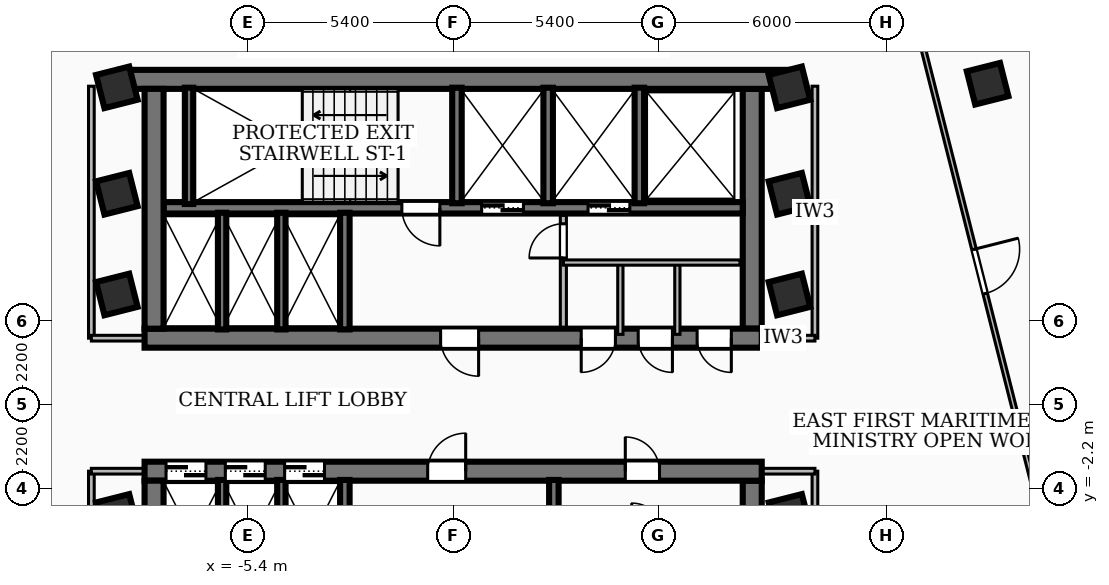
"""IFC4 building model, lengths in metres.
Left out: names, types, materials, properties, quantities, classifications, styles, units other than length and angle.
Written with IfcOpenShell. Run it as: python <this file> out.ifc"""

import sys

from ifc_helpers import new_model, si_unit, direction, frame, frame_2d, origin, origin_2d, place, context, subcontext, project, spatial, rectangle, extrude, element, fill, save


model = new_model("IFC4")
c1 = context("Model", 3, precision=1e-05, world=origin(), true_north=direction((0.0, 1.0)))
c2 = subcontext(c1, "Body", "Model", "MODEL_VIEW")
j1 = project(units=[si_unit("LENGTHUNIT", "METRE"), si_unit("PLANEANGLEUNIT", "RADIAN")], contexts=[c1])
p1 = place(None, origin())
s1 = spatial("IfcSite", under=j1, at=p1, CompositionType="ELEMENT")
p2 = place(p1, origin())
s2 = spatial("IfcBuilding", under=s1, at=p2, CompositionType="ELEMENT")
p3 = place(p2, frame((0.0, 0.0, 130.68)))
s3 = spatial("IfcBuildingStorey", under=s2, at=p3, CompositionType="ELEMENT", Elevation=130.68)
p4 = place(p3, frame((-8.78, 8.56, 0.0), z_axis=(0.0, 0.0, 1.0), x_axis=(1.0, 0.0, 0.0)))
e1 = element("IfcWall", 1, at=p4, inside=s3, PredefinedType="SHEAR", context=c2, shape_type="SweptSolid", body=[
    extrude(rectangle(XDim=17.56, YDim=0.5, at=frame_2d((8.78, 0.0))), origin(), (0.0, 0.0, 1.0), 3.32),
])
p5 = place(p3, frame((8.12, 1.75, 0.0), z_axis=(0.0, 0.0, 1.0), x_axis=(-1.0, 0.0, 0.0)))
e2 = element("IfcWall", 2, at=p5, inside=s3, PredefinedType="SHEAR", context=c2, shape_type="SweptSolid", body=[
    extrude(rectangle(XDim=16.24, YDim=0.5, at=frame_2d((8.12, 0.0))), origin(), (0.0, 0.0, 1.0), 3.32),
])
p6 = place(p5, frame((7.45, 0.0, 0.0)))
e3 = element("IfcOpeningElement", 3, at=p6, cuts=e2, PredefinedType="OPENING", context=c2, shape_type="SweptSolid", body=[
    extrude(rectangle(XDim=1.0, YDim=2.1, at=frame_2d((0.5, 1.05))), frame((0.0, 0.26, 0.0), z_axis=(0.0, -1.0, 0.0), x_axis=(1.0, 0.0, 0.0)), (0.0, 0.0, 1.0), 0.52),
])
p7 = place(p5, frame((3.85, 0.0, 0.0)))
e4 = element("IfcOpeningElement", 4, at=p7, cuts=e2, PredefinedType="OPENING", context=c2, shape_type="SweptSolid", body=[
    extrude(rectangle(XDim=0.9, YDim=2.06, at=frame_2d((0.45, 1.03))), frame((0.0, 0.26, 0.0), z_axis=(0.0, -1.0, 0.0), x_axis=(1.0, 0.0, 0.0)), (0.0, 0.0, 1.0), 0.52),
])
p8 = place(p5, frame((2.35, 0.0, 0.0)))
e5 = element("IfcOpeningElement", 5, at=p8, cuts=e2, PredefinedType="OPENING", context=c2, shape_type="SweptSolid", body=[
    extrude(rectangle(XDim=0.9, YDim=2.06, at=frame_2d((0.45, 1.03))), frame((0.0, 0.26, 0.0), z_axis=(0.0, -1.0, 0.0), x_axis=(1.0, 0.0, 0.0)), (0.0, 0.0, 1.0), 0.52),
])
p9 = place(p5, frame((0.8, 0.0, 0.0)))
e6 = element("IfcOpeningElement", 6, at=p9, cuts=e2, PredefinedType="OPENING", context=c2, shape_type="SweptSolid", body=[
    extrude(rectangle(XDim=0.9, YDim=2.06, at=frame_2d((0.45, 1.03))), frame((0.0, 0.26, 0.0), z_axis=(0.0, -1.0, 0.0), x_axis=(1.0, 0.0, 0.0)), (0.0, 0.0, 1.0), 0.52),
])
for number, where, z_axis, x_axis in (
    (7, (-7.87, 2.0, 0.0), (0.0, 0.0, 1.0), (0.0, 1.0, 0.0)),
    (8, (7.87, 8.31, 0.0), (0.0, 0.0, 1.0), (0.0, -1.0, 0.0)),
):
    element("IfcWall", number, at=place(p3, frame(where, z_axis=z_axis, x_axis=x_axis)), inside=s3, PredefinedType="SHEAR", context=c2, shape_type="SweptSolid", body=[
        extrude(rectangle(XDim=6.31, YDim=0.5, at=frame_2d((3.155, 0.0))), origin(), (0.0, 0.0, 1.0), 3.32),
    ])
p10 = place(p3, frame((7.62, 5.18, 0.0), z_axis=(0.0, 0.0, 1.0), x_axis=(-1.0, 0.0, 0.0)))
e9 = element("IfcWall", 9, at=p10, inside=s3, PredefinedType="SOLIDWALL", context=c2, shape_type="SweptSolid", body=[
    extrude(rectangle(XDim=15.24, YDim=0.3, at=frame_2d((7.62, 0.0))), origin(), (0.0, 0.0, 1.0), 3.32),
])
p11 = place(p10, frame((5.77, 0.0, 0.0)))
e10 = element("IfcOpeningElement", 10, at=p11, cuts=e9, PredefinedType="OPENING", context=c2, shape_type="SweptSolid", body=[
    extrude(rectangle(XDim=1.1, YDim=2.15, at=frame_2d((0.55, 1.075))), frame((0.0, 0.16, 0.0), z_axis=(0.0, -1.0, 0.0), x_axis=(1.0, 0.0, 0.0)), (0.0, 0.0, 1.0), 0.32),
])
p12 = place(p10, frame((2.97, 0.0, 0.0)))
e11 = element("IfcOpeningElement", 11, at=p12, cuts=e9, PredefinedType="OPENING", context=c2, shape_type="SweptSolid", body=[
    extrude(rectangle(XDim=1.1, YDim=2.15, at=frame_2d((0.55, 1.075))), frame((0.0, 0.16, 0.0), z_axis=(0.0, -1.0, 0.0), x_axis=(1.0, 0.0, 0.0)), (0.0, 0.0, 1.0), 0.32),
])
p13 = place(p10, frame((7.97, 0.0, 0.0)))
e12 = element("IfcOpeningElement", 12, at=p13, cuts=e9, PredefinedType="OPENING", context=c2, shape_type="SweptSolid", body=[
    extrude(rectangle(XDim=1.0, YDim=2.1, at=frame_2d((0.5, 1.05))), frame((0.0, 0.16, 0.0), z_axis=(0.0, -1.0, 0.0), x_axis=(1.0, 0.0, 0.0)), (0.0, 0.0, 1.0), 0.32),
])
p14 = place(p3, frame((-8.12, -1.75, 0.0), z_axis=(0.0, 0.0, 1.0), x_axis=(1.0, 0.0, 0.0)))
e13 = element("IfcWall", 13, at=p14, inside=s3, PredefinedType="SHEAR", context=c2, shape_type="SweptSolid", body=[
    extrude(rectangle(XDim=16.24, YDim=0.5, at=frame_2d((8.12, 0.0))), origin(), (0.0, 0.0, 1.0), 3.32),
])
p15 = place(p14, frame((7.45, 0.0, 0.0)))
e14 = element("IfcOpeningElement", 14, at=p15, cuts=e13, PredefinedType="OPENING", context=c2, shape_type="SweptSolid", body=[
    extrude(rectangle(XDim=1.0, YDim=2.1, at=frame_2d((0.5, 1.05))), frame((0.0, 0.26, 0.0), z_axis=(0.0, -1.0, 0.0), x_axis=(1.0, 0.0, 0.0)), (0.0, 0.0, 1.0), 0.52),
])
p16 = place(p14, frame((12.65, 0.0, 0.0)))
e15 = element("IfcOpeningElement", 15, at=p16, cuts=e13, PredefinedType="OPENING", context=c2, shape_type="SweptSolid", body=[
    extrude(rectangle(XDim=0.9, YDim=2.06, at=frame_2d((0.45, 1.03))), frame((0.0, 0.26, 0.0), z_axis=(0.0, -1.0, 0.0), x_axis=(1.0, 0.0, 0.0)), (0.0, 0.0, 1.0), 0.52),
])
p17 = place(p14, frame((0.565, 0.0, 0.0)))
e16 = element("IfcOpeningElement", 16, at=p17, cuts=e13, PredefinedType="OPENING", context=c2, shape_type="SweptSolid", body=[
    extrude(rectangle(XDim=1.05, YDim=2.15, at=frame_2d((0.525, 1.075))), frame((0.0, 0.26, 0.0), z_axis=(0.0, -1.0, 0.0), x_axis=(1.0, 0.0, 0.0)), (0.0, 0.0, 1.0), 0.52),
])
p18 = place(p14, frame((2.125, 0.0, 0.0)))
e17 = element("IfcOpeningElement", 17, at=p18, cuts=e13, PredefinedType="OPENING", context=c2, shape_type="SweptSolid", body=[
    extrude(rectangle(XDim=1.05, YDim=2.15, at=frame_2d((0.525, 1.075))), frame((0.0, 0.26, 0.0), z_axis=(0.0, -1.0, 0.0), x_axis=(1.0, 0.0, 0.0)), (0.0, 0.0, 1.0), 0.52),
])
p19 = place(p14, frame((3.685, 0.0, 0.0)))
e18 = element("IfcOpeningElement", 18, at=p19, cuts=e13, PredefinedType="OPENING", context=c2, shape_type="SweptSolid", body=[
    extrude(rectangle(XDim=1.05, YDim=2.15, at=frame_2d((0.525, 1.075))), frame((0.0, 0.26, 0.0), z_axis=(0.0, -1.0, 0.0), x_axis=(1.0, 0.0, 0.0)), (0.0, 0.0, 1.0), 0.52),
])
for number, where, z_axis, x_axis in (
    (19, (-7.87, -8.31, 0.0), (0.0, 0.0, 1.0), (0.0, 1.0, 0.0)),
    (20, (7.87, -2.0, 0.0), (0.0, 0.0, 1.0), (0.0, -1.0, 0.0)),
):
    element("IfcWall", number, at=place(p3, frame(where, z_axis=z_axis, x_axis=x_axis)), inside=s3, PredefinedType="SHEAR", context=c2, shape_type="SweptSolid", body=[
        extrude(rectangle(XDim=6.31, YDim=0.5, at=frame_2d((3.155, 0.0))), origin(), (0.0, 0.0, 1.0), 3.32),
    ])
p20 = place(p3, frame((-6.95, 5.28, 0.0), z_axis=(0.0, 0.0, 1.0), x_axis=(0.0, 1.0, 0.0)))
e21 = element("IfcWall", 21, at=p20, inside=s3, PredefinedType="SOLIDWALL", context=c2, shape_type="SweptSolid", body=[
    extrude(rectangle(XDim=3.06, YDim=0.22, at=frame_2d((1.53, 0.0))), origin(), (0.0, 0.0, 1.0), 3.32),
])
for number, where, z_axis, x_axis in (
    (22, (0.1, 5.3, 0.0), (0.0, 0.0, 1.0), (0.0, 1.0, 0.0)),
    (23, (2.5, 5.3, 0.0), (0.0, 0.0, 1.0), (0.0, 1.0, 0.0)),
    (24, (4.9, 5.3, 0.0), (0.0, 0.0, 1.0), (0.0, 1.0, 0.0)),
):
    element("IfcWall", number, at=place(p3, frame(where, z_axis=z_axis, x_axis=x_axis)), inside=s3, PredefinedType="SOLIDWALL", context=c2, shape_type="SweptSolid", body=[
        extrude(rectangle(XDim=3.04, YDim=0.25, at=frame_2d((1.52, 0.0))), origin(), (0.0, 0.0, 1.0), 3.32),
    ])
for number, where, z_axis, x_axis in (
    (25, (-2.85, 1.98, 0.0), (0.0, 0.0, 1.0), (0.0, 1.0, 0.0)),
    (26, (-2.85, -5.05, 0.0), (0.0, 0.0, 1.0), (0.0, 1.0, 0.0)),
    (27, (2.65, -5.05, 0.0), (0.0, 0.0, 1.0), (0.0, 1.0, 0.0)),
):
    element("IfcWall", number, at=place(p3, frame(where, z_axis=z_axis, x_axis=x_axis)), inside=s3, PredefinedType="SOLIDWALL", context=c2, shape_type="SweptSolid", body=[
        extrude(rectangle(XDim=3.07, YDim=0.25, at=frame_2d((1.535, 0.0))), origin(), (0.0, 0.0, 1.0), 3.32),
    ])
for number, where, z_axis, x_axis in (
    (28, (-6.08, 1.98, 0.0), (0.0, 0.0, 1.0), (0.0, 1.0, 0.0)),
    (29, (-4.52, 1.98, 0.0), (0.0, 0.0, 1.0), (0.0, 1.0, 0.0)),
    (30, (-6.08, -5.05, 0.0), (0.0, 0.0, 1.0), (0.0, 1.0, 0.0)),
    (31, (-4.52, -5.05, 0.0), (0.0, 0.0, 1.0), (0.0, 1.0, 0.0)),
):
    element("IfcWall", number, at=place(p3, frame(where, z_axis=z_axis, x_axis=x_axis)), inside=s3, PredefinedType="SOLIDWALL", context=c2, shape_type="SweptSolid", body=[
        extrude(rectangle(XDim=3.07, YDim=0.22, at=frame_2d((1.535, 0.0))), origin(), (0.0, 0.0, 1.0), 3.32),
    ])
for number, where, z_axis, x_axis in (
    (32, (-8.85, -2.9, 0.0), (0.0, 0.0, 1.0), (0.969, 0.245, 0.0)),
    (33, (-8.85, 2.9, 0.0), (0.0, 0.0, 1.0), (0.969, 0.245, 0.0)),
    (34, (-8.85, 5.55, 0.0), (0.0, 0.0, 1.0), (0.969, 0.245, 0.0)),
    (35, (8.85, -2.9, 0.0), (0.0, 0.0, 1.0), (0.969, 0.245, 0.0)),
    (36, (8.85, 2.9, 0.0), (0.0, 0.0, 1.0), (0.969, 0.245, 0.0)),
    (37, (8.85, 5.55, 0.0), (0.0, 0.0, 1.0), (0.969, 0.245, 0.0)),
    (38, (-8.85, 8.35, 0.0), (0.0, 0.0, 1.0), (0.969, 0.245, 0.0)),
    (39, (8.85, 8.35, 0.0), (0.0, 0.0, 1.0), (0.969, 0.245, 0.0)),
    (40, (14.064, 8.445, 0.0), (0.0, 0.0, 1.0), (0.969, 0.245, 0.0)),
):
    element("IfcColumn", number, at=place(p3, frame(where, z_axis=z_axis, x_axis=x_axis)), inside=s3, PredefinedType="COLUMN", context=c2, shape_type="SweptSolid", body=[
        extrude(rectangle(XDim=0.9, YDim=0.9, at=origin_2d()), origin(), (0.0, 0.0, 1.0), 3.6),
    ])
p21 = place(p3, frame((2.9, 2.04, 0.0), z_axis=(0.0, 0.0, 1.0), x_axis=(0.0, 1.0, 0.0)))
e41 = element("IfcWall", 41, at=p21, inside=s3, PredefinedType="PARTITIONING", context=c2, shape_type="SweptSolid", body=[
    extrude(rectangle(XDim=2.94, YDim=0.16, at=frame_2d((1.47, 0.0))), origin(), (0.0, 0.0, 1.0), 2.55),
])
p22 = place(p21, frame((1.82, 0.0, 0.0)))
e42 = element("IfcOpeningElement", 42, at=p22, cuts=e41, PredefinedType="OPENING", context=c2, shape_type="SweptSolid", body=[
    extrude(rectangle(XDim=0.9, YDim=2.06, at=frame_2d((0.45, 1.03))), frame((0.0, 0.09, 0.0), z_axis=(0.0, -1.0, 0.0), x_axis=(1.0, 0.0, 0.0)), (0.0, 0.0, 1.0), 0.18),
])
p23 = place(p3, frame((2.9, 3.74, 0.0), z_axis=(0.0, 0.0, 1.0), x_axis=(1.0, 0.0, 0.0)))
e43 = element("IfcWall", 43, at=p23, inside=s3, PredefinedType="PARTITIONING", context=c2, shape_type="SweptSolid", body=[
    extrude(rectangle(XDim=4.65, YDim=0.138, at=frame_2d((2.325, 0.0))), origin(), (0.0, 0.0, 1.0), 3.32),
])
for number, where, z_axis, x_axis in (
    (44, (4.4, 1.85, 0.0), (0.0, 0.0, 1.0), (0.0, 1.0, 0.0)),
    (45, (5.9, 1.85, 0.0), (0.0, 0.0, 1.0), (0.0, 1.0, 0.0)),
):
    element("IfcWall", number, at=place(p3, frame(where, z_axis=z_axis, x_axis=x_axis)), inside=s3, PredefinedType="PARTITIONING", context=c2, shape_type="SweptSolid", body=[
        extrude(rectangle(XDim=1.89, YDim=0.138, at=frame_2d((0.945, 0.0))), origin(), (0.0, 0.0, 1.0), 2.55),
    ])
p24 = place(p3, frame((-9.52, 1.75, 0.0), z_axis=(0.0, 0.0, 1.0), x_axis=(0.0, 1.0, 0.0)))
e46 = element("IfcWall", 46, at=p24, inside=s3, PredefinedType="PARTITIONING", context=c2, shape_type="SweptSolid", body=[
    extrude(rectangle(XDim=6.63, YDim=0.15, at=frame_2d((3.315, 0.0))), origin(), (0.0, 0.0, 1.0), 2.55),
])
p25 = place(p3, frame((-7.85, 1.75, 0.0), z_axis=(0.0, 0.0, 1.0), x_axis=(-1.0, 0.0, 0.0)))
e47 = element("IfcWall", 47, at=p25, inside=s3, PredefinedType="PARTITIONING", context=c2, shape_type="SweptSolid", body=[
    extrude(rectangle(XDim=1.67, YDim=0.15, at=frame_2d((0.835, 0.0))), origin(), (0.0, 0.0, 1.0), 2.55),
])
p26 = place(p3, frame((-9.52, -8.38, 0.0), z_axis=(0.0, 0.0, 1.0), x_axis=(0.0, 1.0, 0.0)))
e48 = element("IfcWall", 48, at=p26, inside=s3, PredefinedType="PARTITIONING", context=c2, shape_type="SweptSolid", body=[
    extrude(rectangle(XDim=6.63, YDim=0.15, at=frame_2d((3.315, 0.0))), origin(), (0.0, 0.0, 1.0), 2.55),
])
p27 = place(p3, frame((-7.85, -1.75, 0.0), z_axis=(0.0, 0.0, 1.0), x_axis=(-1.0, 0.0, 0.0)))
e49 = element("IfcWall", 49, at=p27, inside=s3, PredefinedType="PARTITIONING", context=c2, shape_type="SweptSolid", body=[
    extrude(rectangle(XDim=1.67, YDim=0.15, at=frame_2d((0.835, 0.0))), origin(), (0.0, 0.0, 1.0), 2.55),
])
p28 = place(p3, frame((9.52, 1.75, 0.0), z_axis=(0.0, 0.0, 1.0), x_axis=(0.0, 1.0, 0.0)))
e50 = element("IfcWall", 50, at=p28, inside=s3, PredefinedType="PARTITIONING", context=c2, shape_type="SweptSolid", body=[
    extrude(rectangle(XDim=6.63, YDim=0.15, at=frame_2d((3.315, 0.0))), origin(), (0.0, 0.0, 1.0), 2.55),
])
p29 = place(p3, frame((7.85, 1.75, 0.0), z_axis=(0.0, 0.0, 1.0), x_axis=(1.0, 0.0, 0.0)))
e51 = element("IfcWall", 51, at=p29, inside=s3, PredefinedType="PARTITIONING", context=c2, shape_type="SweptSolid", body=[
    extrude(rectangle(XDim=1.67, YDim=0.15, at=frame_2d((0.835, 0.0))), origin(), (0.0, 0.0, 1.0), 2.55),
])
p30 = place(p3, frame((9.52, -8.38, 0.0), z_axis=(0.0, 0.0, 1.0), x_axis=(0.0, 1.0, 0.0)))
e52 = element("IfcWall", 52, at=p30, inside=s3, PredefinedType="PARTITIONING", context=c2, shape_type="SweptSolid", body=[
    extrude(rectangle(XDim=6.63, YDim=0.15, at=frame_2d((3.315, 0.0))), origin(), (0.0, 0.0, 1.0), 2.55),
])
p31 = place(p3, frame((7.85, -1.75, 0.0), z_axis=(0.0, 0.0, 1.0), x_axis=(1.0, 0.0, 0.0)))
e53 = element("IfcWall", 53, at=p31, inside=s3, PredefinedType="PARTITIONING", context=c2, shape_type="SweptSolid", body=[
    extrude(rectangle(XDim=1.67, YDim=0.15, at=frame_2d((0.835, 0.0))), origin(), (0.0, 0.0, 1.0), 2.55),
])
p32 = place(p3, frame((11.342, 13.433, 0.0), z_axis=(0.0, 0.0, 1.0), x_axis=(0.24525085526, -0.969459652587, 0.0)))
e54 = element("IfcWall", 54, at=p32, inside=s3, PredefinedType="PARTITIONING", context=c2, shape_type="SweptSolid", body=[
    extrude(rectangle(XDim=20.261, YDim=0.12, at=frame_2d((10.13, 0.0))), origin(), (0.0, 0.0, 1.0), 2.55),
])
p33 = place(p32, frame((9.64, 0.0, 0.0)))
e55 = element("IfcOpeningElement", 55, at=p33, cuts=e54, PredefinedType="OPENING", context=c2, shape_type="SweptSolid", body=[
    extrude(rectangle(XDim=1.2, YDim=2.1, at=frame_2d((0.6, 1.05))), frame((0.0, 0.07, 0.0), z_axis=(0.0, -1.0, 0.0), x_axis=(1.0, 0.0, 0.0)), (0.0, 0.0, 1.0), 0.14),
])
p34 = place(p6, origin())
e56 = element("IfcDoor", 56, at=p34, inside=s3, OperationType="SINGLE_SWING_LEFT", PredefinedType="DOOR", context=c2, shape_type="SweptSolid", body=[
    extrude(rectangle(XDim=1.0, YDim=2.1, at=frame_2d((0.5, 1.05))), frame((0.0, 0.025, 0.0), z_axis=(0.0, -1.0, 0.0), x_axis=(1.0, 0.0, 0.0)), (0.0, 0.0, 1.0), 0.05),
])
fill(e3, e56)
p35 = place(p15, origin())
e57 = element("IfcDoor", 57, at=p35, inside=s3, OperationType="SINGLE_SWING_RIGHT", PredefinedType="DOOR", context=c2, shape_type="SweptSolid", body=[
    extrude(rectangle(XDim=1.0, YDim=2.1, at=frame_2d((0.5, 1.05))), frame((0.0, 0.025, 0.0), z_axis=(0.0, -1.0, 0.0), x_axis=(1.0, 0.0, 0.0)), (0.0, 0.0, 1.0), 0.05),
])
fill(e14, e57)
p36 = place(p11, origin())
e58 = element("IfcDoor", 58, at=p36, inside=s3, OperationType="DOUBLE_DOOR_SLIDING", PredefinedType="DOOR", context=c2, shape_type="SweptSolid", body=[
    extrude(rectangle(XDim=1.1, YDim=2.15, at=frame_2d((0.55, 1.075))), frame((0.0, 0.025, 0.0), z_axis=(0.0, -1.0, 0.0), x_axis=(1.0, 0.0, 0.0)), (0.0, 0.0, 1.0), 0.05),
])
fill(e10, e58)
p37 = place(p12, origin())
e59 = element("IfcDoor", 59, at=p37, inside=s3, OperationType="DOUBLE_DOOR_SLIDING", PredefinedType="DOOR", context=c2, shape_type="SweptSolid", body=[
    extrude(rectangle(XDim=1.1, YDim=2.15, at=frame_2d((0.55, 1.075))), frame((0.0, 0.025, 0.0), z_axis=(0.0, -1.0, 0.0), x_axis=(1.0, 0.0, 0.0)), (0.0, 0.0, 1.0), 0.05),
])
fill(e11, e59)
p38 = place(p13, origin())
e60 = element("IfcDoor", 60, at=p38, inside=s3, OperationType="SINGLE_SWING_LEFT", PredefinedType="DOOR", context=c2, shape_type="SweptSolid", body=[
    extrude(rectangle(XDim=1.0, YDim=2.1, at=frame_2d((0.5, 1.05))), frame((0.0, 0.025, 0.0), z_axis=(0.0, -1.0, 0.0), x_axis=(1.0, 0.0, 0.0)), (0.0, 0.0, 1.0), 0.05),
])
fill(e12, e60)
p39 = place(p16, origin())
e61 = element("IfcDoor", 61, at=p39, inside=s3, OperationType="SINGLE_SWING_LEFT", PredefinedType="DOOR", context=c2, shape_type="SweptSolid", body=[
    extrude(rectangle(XDim=0.9, YDim=2.06, at=frame_2d((0.45, 1.03))), frame((0.0, 0.025, 0.0), z_axis=(0.0, -1.0, 0.0), x_axis=(1.0, 0.0, 0.0)), (0.0, 0.0, 1.0), 0.05),
])
fill(e15, e61)
p40 = place(p17, origin())
e62 = element("IfcDoor", 62, at=p40, inside=s3, OperationType="DOUBLE_DOOR_SLIDING", PredefinedType="DOOR", context=c2, shape_type="SweptSolid", body=[
    extrude(rectangle(XDim=1.05, YDim=2.15, at=frame_2d((0.525, 1.075))), frame((0.0, 0.025, 0.0), z_axis=(0.0, -1.0, 0.0), x_axis=(1.0, 0.0, 0.0)), (0.0, 0.0, 1.0), 0.05),
])
fill(e16, e62)
p41 = place(p18, origin())
e63 = element("IfcDoor", 63, at=p41, inside=s3, OperationType="DOUBLE_DOOR_SLIDING", PredefinedType="DOOR", context=c2, shape_type="SweptSolid", body=[
    extrude(rectangle(XDim=1.05, YDim=2.15, at=frame_2d((0.525, 1.075))), frame((0.0, 0.025, 0.0), z_axis=(0.0, -1.0, 0.0), x_axis=(1.0, 0.0, 0.0)), (0.0, 0.0, 1.0), 0.05),
])
fill(e17, e63)
p42 = place(p19, origin())
e64 = element("IfcDoor", 64, at=p42, inside=s3, OperationType="DOUBLE_DOOR_SLIDING", PredefinedType="DOOR", context=c2, shape_type="SweptSolid", body=[
    extrude(rectangle(XDim=1.05, YDim=2.15, at=frame_2d((0.525, 1.075))), frame((0.0, 0.025, 0.0), z_axis=(0.0, -1.0, 0.0), x_axis=(1.0, 0.0, 0.0)), (0.0, 0.0, 1.0), 0.05),
])
fill(e18, e64)
p43 = place(p7, origin())
e65 = element("IfcDoor", 65, at=p43, inside=s3, OperationType="SINGLE_SWING_RIGHT", PredefinedType="DOOR", context=c2, shape_type="SweptSolid", body=[
    extrude(rectangle(XDim=0.9, YDim=2.06, at=frame_2d((0.45, 1.03))), frame((0.0, 0.025, 0.0), z_axis=(0.0, -1.0, 0.0), x_axis=(1.0, 0.0, 0.0)), (0.0, 0.0, 1.0), 0.05),
])
fill(e4, e65)
p44 = place(p8, origin())
e66 = element("IfcDoor", 66, at=p44, inside=s3, OperationType="SINGLE_SWING_LEFT", PredefinedType="DOOR", context=c2, shape_type="SweptSolid", body=[
    extrude(rectangle(XDim=0.9, YDim=2.06, at=frame_2d((0.45, 1.03))), frame((0.0, 0.025, 0.0), z_axis=(0.0, -1.0, 0.0), x_axis=(1.0, 0.0, 0.0)), (0.0, 0.0, 1.0), 0.05),
])
fill(e5, e66)
p45 = place(p9, origin())
e67 = element("IfcDoor", 67, at=p45, inside=s3, OperationType="SINGLE_SWING_LEFT", PredefinedType="DOOR", context=c2, shape_type="SweptSolid", body=[
    extrude(rectangle(XDim=0.9, YDim=2.06, at=frame_2d((0.45, 1.03))), frame((0.0, 0.025, 0.0), z_axis=(0.0, -1.0, 0.0), x_axis=(1.0, 0.0, 0.0)), (0.0, 0.0, 1.0), 0.05),
])
fill(e6, e67)
p46 = place(p22, origin())
e68 = element("IfcDoor", 68, at=p46, inside=s3, OperationType="SINGLE_SWING_LEFT", PredefinedType="DOOR", context=c2, shape_type="SweptSolid", body=[
    extrude(rectangle(XDim=0.9, YDim=2.06, at=frame_2d((0.45, 1.03))), frame((0.0, 0.025, 0.0), z_axis=(0.0, -1.0, 0.0), x_axis=(1.0, 0.0, 0.0)), (0.0, 0.0, 1.0), 0.05),
])
fill(e42, e68)
p47 = place(p33, origin())
e69 = element("IfcDoor", 69, at=p47, inside=s3, OperationType="SINGLE_SWING_LEFT", PredefinedType="DOOR", context=c2, shape_type="SweptSolid", body=[
    extrude(rectangle(XDim=1.2, YDim=2.1, at=frame_2d((0.6, 1.05))), frame((0.0, 0.025, 0.0), z_axis=(0.0, -1.0, 0.0), x_axis=(1.0, 0.0, 0.0)), (0.0, 0.0, 1.0), 0.05),
])
fill(e55, e69)
save(model, sys.argv[1])
